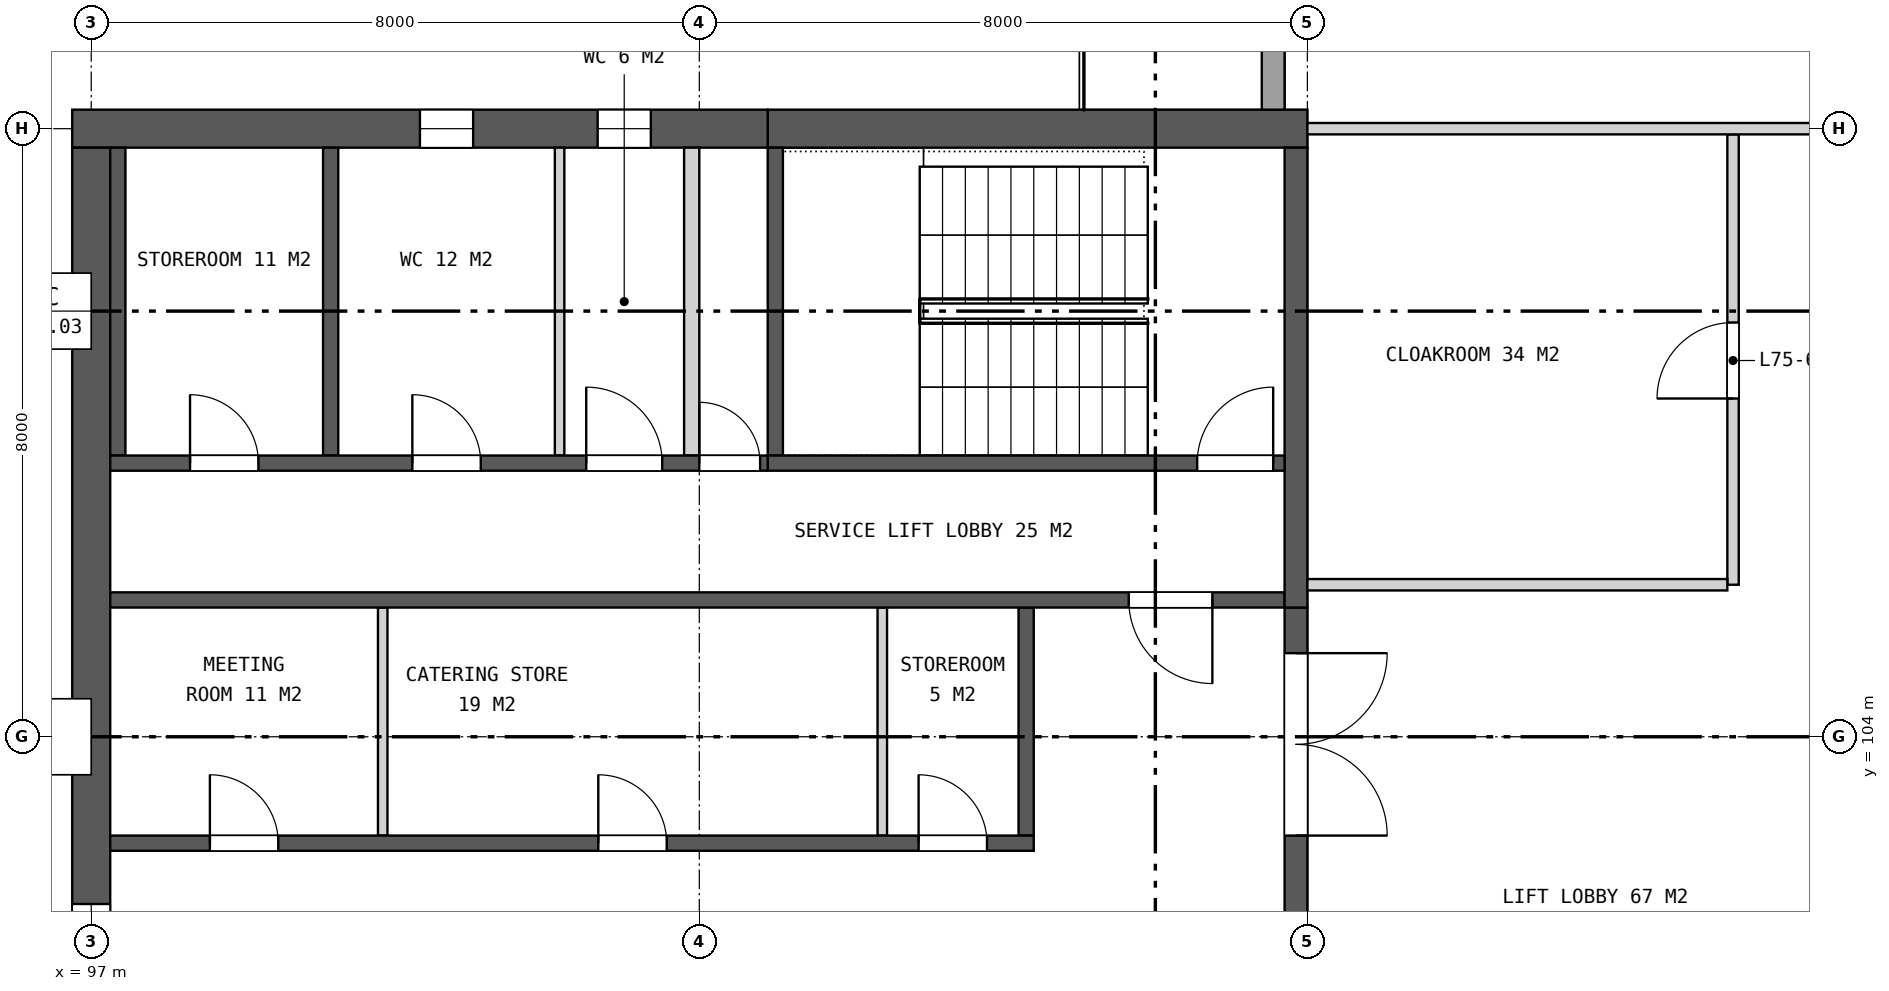
"""IFC4 building model, lengths in metres.
Left out: names, types, materials, properties, quantities, classifications, styles, units other than length and angle.
Written with IfcOpenShell. Run it as: python <this file> out.ifc"""

import sys

from ifc_helpers import new_model, si_unit, direction, frame, frame_2d, origin, place, context, subcontext, project, spatial, rectangle, extrude, element, fill, save


model = new_model("IFC4")
c1 = context("Model", 3, precision=1e-05, world=origin(), true_north=direction((0.0, 1.0)))
c2 = subcontext(c1, "Body", "Model", "MODEL_VIEW")
j1 = project(units=[si_unit("LENGTHUNIT", "METRE"), si_unit("PLANEANGLEUNIT", "RADIAN")], contexts=[c1])
p1 = place(None, origin())
s1 = spatial("IfcSite", under=j1, at=p1, CompositionType="ELEMENT")
p2 = place(p1, origin())
s2 = spatial("IfcBuilding", under=s1, at=p2, CompositionType="ELEMENT")
p3 = place(p2, frame((0.0, 0.0, 344.9)))
s3 = spatial("IfcBuildingStorey", under=s2, at=p3, CompositionType="ELEMENT", Elevation=344.9)
p4 = place(p3, frame((113.0, 112.0, 0.0), z_axis=(0.0, 0.0, 1.0), x_axis=(-1.0, 0.0, 0.0)))
e1 = element("IfcWall", 1, at=p4, inside=s3, PredefinedType="SHEAR", context=c2, shape_type="SweptSolid", body=[
    extrude(rectangle(XDim=7.1, YDim=0.5, at=frame_2d((3.55, 0.0))), origin(), (0.0, 0.0, 1.0), 4.2),
])
p5 = place(p3, frame((105.9, 112.0, 0.0), z_axis=(0.0, 0.0, 1.0), x_axis=(-1.0, 0.0, 0.0)))
e2 = element("IfcWall", 2, at=p5, inside=s3, PredefinedType="SHEAR", context=c2, shape_type="SweptSolid", body=[
    extrude(rectangle(XDim=9.15, YDim=0.5, at=frame_2d((4.575, 0.0))), origin(), (0.0, 0.0, 1.0), 4.2),
])
p6 = place(p5, frame((1.538, 0.0, 1.5)))
e3 = element("IfcOpeningElement", 3, at=p6, cuts=e2, PredefinedType="OPENING", context=c2, shape_type="SweptSolid", body=[
    extrude(rectangle(XDim=0.7, YDim=0.9, at=frame_2d((0.35, 0.45))), frame((0.0, 0.26, 0.0), z_axis=(0.0, -1.0, 0.0), x_axis=(1.0, 0.0, 0.0)), (0.0, 0.0, 1.0), 0.52),
])
p7 = place(p5, frame((3.875, 0.0, 1.5)))
e4 = element("IfcOpeningElement", 4, at=p7, cuts=e2, PredefinedType="OPENING", context=c2, shape_type="SweptSolid", body=[
    extrude(rectangle(XDim=0.7, YDim=0.9, at=frame_2d((0.35, 0.45))), frame((0.0, 0.26, 0.0), z_axis=(0.0, -1.0, 0.0), x_axis=(1.0, 0.0, 0.0)), (0.0, 0.0, 1.0), 0.52),
])
p8 = place(p3, frame((97.0, 111.75, 0.0), z_axis=(0.0, 0.0, 1.0), x_axis=(0.0, -1.0, 0.0)))
e5 = element("IfcWall", 5, at=p8, inside=s3, PredefinedType="SHEAR", context=c2, shape_type="SweptSolid", body=[
    extrude(rectangle(XDim=23.5, YDim=0.5, at=frame_2d((11.75, 0.0))), origin(), (0.0, 0.0, 1.0), 4.2),
])
p9 = place(p8, frame((9.95, 0.0, 0.15)))
e6 = element("IfcOpeningElement", 6, at=p9, cuts=e5, PredefinedType="OPENING", context=c2, shape_type="SweptSolid", body=[
    extrude(rectangle(XDim=3.6, YDim=3.0, at=frame_2d((1.8, 1.5))), frame((0.0, 0.26, 0.0), z_axis=(0.0, -1.0, 0.0), x_axis=(1.0, 0.0, 0.0)), (0.0, 0.0, 1.0), 0.52),
])
p10 = place(p3, frame((112.85, 105.7, 0.0), z_axis=(0.0, 0.0, 1.0), x_axis=(0.0, -1.0, 0.0)))
e7 = element("IfcWall", 7, at=p10, inside=s3, PredefinedType="SHEAR", context=c2, shape_type="SweptSolid", body=[
    extrude(rectangle(XDim=11.4, YDim=0.3, at=frame_2d((5.7, 0.0))), origin(), (0.0, 0.0, 1.0), 4.2),
])
p11 = place(p10, frame((0.6, 0.0, 0.0)))
e8 = element("IfcOpeningElement", 8, at=p11, cuts=e7, PredefinedType="OPENING", context=c2, shape_type="SweptSolid", body=[
    extrude(rectangle(XDim=2.4, YDim=2.4, at=frame_2d((1.2, 1.2))), frame((0.0, 0.16, 0.0), z_axis=(0.0, -1.0, 0.0), x_axis=(1.0, 0.0, 0.0)), (0.0, 0.0, 1.0), 0.32),
])
p12 = place(p10, frame((4.5, 0.0, 0.0)))
e9 = element("IfcOpeningElement", 9, at=p12, cuts=e7, PredefinedType="OPENING", context=c2, shape_type="SweptSolid", body=[
    extrude(rectangle(XDim=2.4, YDim=2.4, at=frame_2d((1.2, 1.2))), frame((0.0, 0.16, 0.0), z_axis=(0.0, -1.0, 0.0), x_axis=(1.0, 0.0, 0.0)), (0.0, 0.0, 1.0), 0.32),
])
p13 = place(p10, frame((8.4, 0.0, 0.0)))
e10 = element("IfcOpeningElement", 10, at=p13, cuts=e7, PredefinedType="OPENING", context=c2, shape_type="SweptSolid", body=[
    extrude(rectangle(XDim=2.4, YDim=2.4, at=frame_2d((1.2, 1.2))), frame((0.0, 0.16, 0.0), z_axis=(0.0, -1.0, 0.0), x_axis=(1.0, 0.0, 0.0)), (0.0, 0.0, 1.0), 0.32),
])
p14 = place(p3, frame((109.3, 105.7, 0.0), z_axis=(0.0, 0.0, 1.0), x_axis=(0.0, -1.0, 0.0)))
e11 = element("IfcWall", 11, at=p14, inside=s3, PredefinedType="SHEAR", context=c2, shape_type="SweptSolid", body=[
    extrude(rectangle(XDim=3.0, YDim=0.2, at=frame_2d((1.5, 0.0))), origin(), (0.0, 0.0, 1.0), 4.2),
])
for number, where, z_axis, x_axis in (
    (12, (107.407, 105.7, 0.0), (0.0, 0.0, 1.0), (0.0, -1.0, 0.0)),
    (13, (100.835, 105.7, 0.0), (0.0, 0.0, 1.0), (0.0, -1.0, 0.0)),
):
    element("IfcWall", number, at=place(p3, frame(where, z_axis=z_axis, x_axis=x_axis)), inside=s3, PredefinedType="PARTITIONING", context=c2, shape_type="SweptSolid", body=[
        extrude(rectangle(XDim=3.0, YDim=0.125, at=frame_2d((1.5, 0.0))), origin(), (0.0, 0.0, 1.0), 4.2),
    ])
p15 = place(p3, frame((109.4, 102.6, 0.0), z_axis=(0.0, 0.0, 1.0), x_axis=(-1.0, 0.0, 0.0)))
e14 = element("IfcWall", 14, at=p15, inside=s3, PredefinedType="SHEAR", context=c2, shape_type="SweptSolid", body=[
    extrude(rectangle(XDim=12.15, YDim=0.2, at=frame_2d((6.075, 0.0))), origin(), (0.0, 0.0, 1.0), 4.2),
])
p16 = place(p15, frame((0.615, 0.0, 0.0)))
e15 = element("IfcOpeningElement", 15, at=p16, cuts=e14, PredefinedType="OPENING", context=c2, shape_type="SweptSolid", body=[
    extrude(rectangle(XDim=0.9, YDim=2.1, at=frame_2d((0.45, 1.05))), frame((0.0, 0.11, 0.0), z_axis=(0.0, -1.0, 0.0), x_axis=(1.0, 0.0, 0.0)), (0.0, 0.0, 1.0), 0.22),
])
p17 = place(p15, frame((4.829, 0.0, 0.0)))
e16 = element("IfcOpeningElement", 16, at=p17, cuts=e14, PredefinedType="OPENING", context=c2, shape_type="SweptSolid", body=[
    extrude(rectangle(XDim=0.9, YDim=2.1, at=frame_2d((0.45, 1.05))), frame((0.0, 0.11, 0.0), z_axis=(0.0, -1.0, 0.0), x_axis=(1.0, 0.0, 0.0)), (0.0, 0.0, 1.0), 0.22),
])
p18 = place(p15, frame((9.939, 0.0, 0.0)))
e17 = element("IfcOpeningElement", 17, at=p18, cuts=e14, PredefinedType="OPENING", context=c2, shape_type="SweptSolid", body=[
    extrude(rectangle(XDim=0.9, YDim=2.1, at=frame_2d((0.45, 1.05))), frame((0.0, 0.11, 0.0), z_axis=(0.0, -1.0, 0.0), x_axis=(1.0, 0.0, 0.0)), (0.0, 0.0, 1.0), 0.22),
])
p19 = place(p3, frame((112.7, 105.8, 0.0), z_axis=(0.0, 0.0, 1.0), x_axis=(-1.0, 0.0, 0.0)))
e18 = element("IfcWall", 18, at=p19, inside=s3, PredefinedType="SHEAR", context=c2, shape_type="SweptSolid", body=[
    extrude(rectangle(XDim=15.45, YDim=0.2, at=frame_2d((7.725, 0.0))), origin(), (0.0, 0.0, 1.0), 4.2),
])
p20 = place(p19, frame((0.95, 0.0, 0.0)))
e19 = element("IfcOpeningElement", 19, at=p20, cuts=e18, PredefinedType="OPENING", context=c2, shape_type="SweptSolid", body=[
    extrude(rectangle(XDim=1.1, YDim=2.1, at=frame_2d((0.55, 1.05))), frame((0.0, 0.11, 0.0), z_axis=(0.0, -1.0, 0.0), x_axis=(1.0, 0.0, 0.0)), (0.0, 0.0, 1.0), 0.22),
])
p21 = place(p3, frame((112.85, 111.75, 0.0), z_axis=(0.0, 0.0, 1.0), x_axis=(0.0, -1.0, 0.0)))
e20 = element("IfcWall", 20, at=p21, inside=s3, PredefinedType="SHEAR", context=c2, shape_type="SweptSolid", body=[
    extrude(rectangle(XDim=6.05, YDim=0.3, at=frame_2d((3.025, 0.0))), origin(), (0.0, 0.0, 1.0), 4.2),
])
for number, where, z_axis, x_axis in (
    (21, (106.0, 111.75, 0.0), (0.0, 0.0, 1.0), (0.0, -1.0, 0.0)),
    (22, (100.15, 111.75, 0.0), (0.0, 0.0, 1.0), (0.0, -1.0, 0.0)),
    (23, (97.35, 111.75, 0.0), (0.0, 0.0, 1.0), (0.0, -1.0, 0.0)),
):
    element("IfcWall", number, at=place(p3, frame(where, z_axis=z_axis, x_axis=x_axis)), inside=s3, PredefinedType="SHEAR", context=c2, shape_type="SweptSolid", body=[
        extrude(rectangle(XDim=4.05, YDim=0.2, at=frame_2d((2.025, 0.0))), origin(), (0.0, 0.0, 1.0), 4.2),
    ])
p22 = place(p3, frame((104.9, 111.75, 0.0), z_axis=(0.0, 0.0, 1.0), x_axis=(0.0, -1.0, 0.0)))
e24 = element("IfcWall", 24, at=p22, inside=s3, PredefinedType="PARTITIONING", context=c2, shape_type="SweptSolid", body=[
    extrude(rectangle(XDim=4.05, YDim=0.2, at=frame_2d((2.025, 0.0))), origin(), (0.0, 0.0, 1.0), 4.2),
])
p23 = place(p3, frame((103.162, 111.75, 0.0), z_axis=(0.0, 0.0, 1.0), x_axis=(0.0, -1.0, 0.0)))
e25 = element("IfcWall", 25, at=p23, inside=s3, PredefinedType="PARTITIONING", context=c2, shape_type="SweptSolid", body=[
    extrude(rectangle(XDim=4.05, YDim=0.125, at=frame_2d((2.025, 0.0))), origin(), (0.0, 0.0, 1.0), 4.2),
])
p24 = place(p3, frame((112.7, 107.6, 0.0), z_axis=(0.0, 0.0, 1.0), x_axis=(-1.0, 0.0, 0.0)))
e26 = element("IfcWall", 26, at=p24, inside=s3, PredefinedType="SHEAR", context=c2, shape_type="SweptSolid", body=[
    extrude(rectangle(XDim=6.8, YDim=0.2, at=frame_2d((3.4, 0.0))), origin(), (0.0, 0.0, 1.0), 4.2),
])
p25 = place(p24, frame((0.15, 0.0, 0.0)))
e27 = element("IfcOpeningElement", 27, at=p25, cuts=e26, PredefinedType="OPENING", context=c2, shape_type="SweptSolid", body=[
    extrude(rectangle(XDim=1.0, YDim=2.1, at=frame_2d((0.5, 1.05))), frame((0.0, 0.11, 0.0), z_axis=(0.0, -1.0, 0.0), x_axis=(1.0, 0.0, 0.0)), (0.0, 0.0, 1.0), 0.22),
])
p26 = place(p3, frame((105.9, 107.6, 0.0), z_axis=(0.0, 0.0, 1.0), x_axis=(-1.0, 0.0, 0.0)))
e28 = element("IfcWall", 28, at=p26, inside=s3, PredefinedType="SHEAR", context=c2, shape_type="SweptSolid", body=[
    extrude(rectangle(XDim=8.65, YDim=0.2, at=frame_2d((4.325, 0.0))), origin(), (0.0, 0.0, 1.0), 4.2),
])
p27 = place(p26, frame((0.1, 0.0, 0.0)))
e29 = element("IfcOpeningElement", 29, at=p27, cuts=e28, PredefinedType="OPENING", context=c2, shape_type="SweptSolid", body=[
    extrude(rectangle(XDim=0.8, YDim=2.1, at=frame_2d((0.4, 1.05))), frame((0.0, 0.11, 0.0), z_axis=(0.0, -1.0, 0.0), x_axis=(1.0, 0.0, 0.0)), (0.0, 0.0, 1.0), 0.22),
])
p28 = place(p26, frame((1.388, 0.0, 0.0)))
e30 = element("IfcOpeningElement", 30, at=p28, cuts=e28, PredefinedType="OPENING", context=c2, shape_type="SweptSolid", body=[
    extrude(rectangle(XDim=1.0, YDim=2.1, at=frame_2d((0.5, 1.05))), frame((0.0, 0.11, 0.0), z_axis=(0.0, -1.0, 0.0), x_axis=(1.0, 0.0, 0.0)), (0.0, 0.0, 1.0), 0.22),
])
p29 = place(p26, frame((3.775, 0.0, 0.0)))
e31 = element("IfcOpeningElement", 31, at=p29, cuts=e28, PredefinedType="OPENING", context=c2, shape_type="SweptSolid", body=[
    extrude(rectangle(XDim=0.9, YDim=2.1, at=frame_2d((0.45, 1.05))), frame((0.0, 0.11, 0.0), z_axis=(0.0, -1.0, 0.0), x_axis=(1.0, 0.0, 0.0)), (0.0, 0.0, 1.0), 0.22),
])
p30 = place(p26, frame((6.7, 0.0, 0.0)))
e32 = element("IfcOpeningElement", 32, at=p30, cuts=e28, PredefinedType="OPENING", context=c2, shape_type="SweptSolid", body=[
    extrude(rectangle(XDim=0.9, YDim=2.1, at=frame_2d((0.45, 1.05))), frame((0.0, 0.11, 0.0), z_axis=(0.0, -1.0, 0.0), x_axis=(1.0, 0.0, 0.0)), (0.0, 0.0, 1.0), 0.22),
])
p31 = place(p3, frame((112.55, 119.962, 0.0), z_axis=(0.0, 0.0, 1.0), x_axis=(0.0, -1.0, 0.0)))
e33 = element("IfcWall", 33, at=p31, inside=s3, PredefinedType="SOLIDWALL", context=c2, shape_type="SweptSolid", body=[
    extrude(rectangle(XDim=7.712, YDim=0.3, at=frame_2d((3.856, 0.0))), origin(), (0.0, 0.0, 1.0), 3.85),
])
p32 = place(p31, frame((2.762, 0.0, 0.0)))
e34 = element("IfcOpeningElement", 34, at=p32, cuts=e33, PredefinedType="OPENING", context=c2, shape_type="SweptSolid", body=[
    extrude(rectangle(XDim=2.4, YDim=2.4, at=frame_2d((1.2, 1.2))), frame((0.0, 0.16, 0.0), z_axis=(0.0, -1.0, 0.0), x_axis=(1.0, 0.0, 0.0)), (0.0, 0.0, 1.0), 0.32),
])
p33 = place(p3, frame((118.6, 106.0, 0.0), z_axis=(0.0, 0.0, 1.0), x_axis=(0.0, 1.0, 0.0)))
e35 = element("IfcWall", 35, at=p33, inside=s3, PredefinedType="PARTITIONING", context=c2, shape_type="SweptSolid", body=[
    extrude(rectangle(XDim=5.925, YDim=0.15, at=frame_2d((2.962, 0.0))), origin(), (0.0, 0.0, 1.0), 3.396),
])
p34 = place(p33, frame((2.45, 0.0, 0.0)))
e36 = element("IfcOpeningElement", 36, at=p34, cuts=e35, PredefinedType="OPENING", context=c2, shape_type="SweptSolid", body=[
    extrude(rectangle(XDim=1.0, YDim=2.1, at=frame_2d((0.5, 1.05))), frame((0.0, 0.085, 0.0), z_axis=(0.0, -1.0, 0.0), x_axis=(1.0, 0.0, 0.0)), (0.0, 0.0, 1.0), 0.17),
])
p35 = place(p3, frame((113.0, 106.0, 0.0), z_axis=(0.0, 0.0, 1.0), x_axis=(1.0, 0.0, 0.0)))
e37 = element("IfcWall", 37, at=p35, inside=s3, PredefinedType="PARTITIONING", context=c2, shape_type="SweptSolid", body=[
    extrude(rectangle(XDim=5.525, YDim=0.15, at=frame_2d((2.762, 0.0))), origin(), (0.0, 0.0, 1.0), 3.396),
])
p36 = place(p3, frame((113.0, 112.0, 0.0), z_axis=(0.0, 0.0, 1.0), x_axis=(1.0, 0.0, 0.0)))
e38 = element("IfcWall", 38, at=p36, inside=s3, PredefinedType="PARTITIONING", context=c2, shape_type="SweptSolid", body=[
    extrude(rectangle(XDim=24.0, YDim=0.15, at=frame_2d((12.0, 0.0))), origin(), (0.0, 0.0, 1.0), 3.396),
])
p37 = place(p36, frame((9.95, 0.0, 0.0)))
e39 = element("IfcOpeningElement", 39, at=p37, cuts=e38, PredefinedType="OPENING", context=c2, shape_type="SweptSolid", body=[
    extrude(rectangle(XDim=1.8, YDim=2.1, at=frame_2d((0.9, 1.05))), frame((0.0, 0.085, 0.0), z_axis=(0.0, -1.0, 0.0), x_axis=(1.0, 0.0, 0.0)), (0.0, 0.0, 1.0), 0.17),
])
p38 = place(p36, frame((16.65, 0.0, 0.0)))
e40 = element("IfcOpeningElement", 40, at=p38, cuts=e38, PredefinedType="OPENING", context=c2, shape_type="SweptSolid", body=[
    extrude(rectangle(XDim=1.0, YDim=2.1, at=frame_2d((0.5, 1.05))), frame((0.0, 0.085, 0.0), z_axis=(0.0, -1.0, 0.0), x_axis=(1.0, 0.0, 0.0)), (0.0, 0.0, 1.0), 0.17),
])
p39 = place(p6, origin())
e41 = element("IfcWindow", 41, at=p39, inside=s3, PartitioningType="SINGLE_PANEL", PredefinedType="WINDOW", context=c2, shape_type="SweptSolid", body=[
    extrude(rectangle(XDim=0.7, YDim=0.9, at=frame_2d((0.35, 0.45))), frame((0.0, 0.03, 0.0), z_axis=(0.0, -1.0, 0.0), x_axis=(1.0, 0.0, 0.0)), (0.0, 0.0, 1.0), 0.06),
])
fill(e3, e41)
p40 = place(p7, origin())
e42 = element("IfcWindow", 42, at=p40, inside=s3, PartitioningType="SINGLE_PANEL", PredefinedType="WINDOW", context=c2, shape_type="SweptSolid", body=[
    extrude(rectangle(XDim=0.7, YDim=0.9, at=frame_2d((0.35, 0.45))), frame((0.0, 0.03, 0.0), z_axis=(0.0, -1.0, 0.0), x_axis=(1.0, 0.0, 0.0)), (0.0, 0.0, 1.0), 0.06),
])
fill(e4, e42)
p41 = place(p9, origin())
e43 = element("IfcWindow", 43, at=p41, inside=s3, PartitioningType="SINGLE_PANEL", PredefinedType="WINDOW", context=c2, shape_type="SweptSolid", body=[
    extrude(rectangle(XDim=3.6, YDim=3.0, at=frame_2d((1.8, 1.5))), frame((0.0, 0.03, 0.0), z_axis=(0.0, -1.0, 0.0), x_axis=(1.0, 0.0, 0.0)), (0.0, 0.0, 1.0), 0.06),
])
fill(e6, e43)
p42 = place(p11, origin())
e44 = element("IfcDoor", 44, at=p42, inside=s3, OperationType="DOUBLE_DOOR_SINGLE_SWING", PredefinedType="DOOR", context=c2, shape_type="SweptSolid", body=[
    extrude(rectangle(XDim=2.4, YDim=2.4, at=frame_2d((1.2, 1.2))), frame((0.0, 0.025, 0.0), z_axis=(0.0, -1.0, 0.0), x_axis=(1.0, 0.0, 0.0)), (0.0, 0.0, 1.0), 0.05),
])
fill(e8, e44)
p43 = place(p16, frame((0.9, 0.0, 0.0), z_axis=(0.0, 0.0, 1.0), x_axis=(-1.0, 0.0, 0.0)))
e45 = element("IfcDoor", 45, at=p43, inside=s3, OperationType="SINGLE_SWING_LEFT", PredefinedType="DOOR", context=c2, shape_type="SweptSolid", body=[
    extrude(rectangle(XDim=0.9, YDim=2.1, at=frame_2d((0.45, 1.05))), frame((0.0, 0.025, 0.0), z_axis=(0.0, -1.0, 0.0), x_axis=(1.0, 0.0, 0.0)), (0.0, 0.0, 1.0), 0.05),
])
fill(e15, e45)
p44 = place(p17, frame((0.9, 0.0, 0.0), z_axis=(0.0, 0.0, 1.0), x_axis=(-1.0, 0.0, 0.0)))
e46 = element("IfcDoor", 46, at=p44, inside=s3, OperationType="SINGLE_SWING_LEFT", PredefinedType="DOOR", context=c2, shape_type="SweptSolid", body=[
    extrude(rectangle(XDim=0.9, YDim=2.1, at=frame_2d((0.45, 1.05))), frame((0.0, 0.025, 0.0), z_axis=(0.0, -1.0, 0.0), x_axis=(1.0, 0.0, 0.0)), (0.0, 0.0, 1.0), 0.05),
])
fill(e16, e46)
p45 = place(p18, frame((0.9, 0.0, 0.0), z_axis=(0.0, 0.0, 1.0), x_axis=(-1.0, 0.0, 0.0)))
e47 = element("IfcDoor", 47, at=p45, inside=s3, OperationType="SINGLE_SWING_LEFT", PredefinedType="DOOR", context=c2, shape_type="SweptSolid", body=[
    extrude(rectangle(XDim=0.9, YDim=2.1, at=frame_2d((0.45, 1.05))), frame((0.0, 0.025, 0.0), z_axis=(0.0, -1.0, 0.0), x_axis=(1.0, 0.0, 0.0)), (0.0, 0.0, 1.0), 0.05),
])
fill(e17, e47)
p46 = place(p20, origin())
e48 = element("IfcDoor", 48, at=p46, inside=s3, OperationType="SINGLE_SWING_LEFT", PredefinedType="DOOR", context=c2, shape_type="SweptSolid", body=[
    extrude(rectangle(XDim=1.1, YDim=2.1, at=frame_2d((0.55, 1.05))), frame((0.0, 0.025, 0.0), z_axis=(0.0, -1.0, 0.0), x_axis=(1.0, 0.0, 0.0)), (0.0, 0.0, 1.0), 0.05),
])
fill(e19, e48)
p47 = place(p25, frame((1.0, 0.0, 0.0), z_axis=(0.0, 0.0, 1.0), x_axis=(-1.0, 0.0, 0.0)))
e49 = element("IfcDoor", 49, at=p47, inside=s3, OperationType="SINGLE_SWING_RIGHT", PredefinedType="DOOR", context=c2, shape_type="SweptSolid", body=[
    extrude(rectangle(XDim=1.0, YDim=2.1, at=frame_2d((0.5, 1.05))), frame((0.0, 0.025, 0.0), z_axis=(0.0, -1.0, 0.0), x_axis=(1.0, 0.0, 0.0)), (0.0, 0.0, 1.0), 0.05),
])
fill(e27, e49)
p48 = place(p27, frame((0.8, 0.0, 0.0), z_axis=(0.0, 0.0, 1.0), x_axis=(-1.0, 0.0, 0.0)))
e50 = element("IfcDoor", 50, at=p48, inside=s3, OperationType="SINGLE_SWING_LEFT", PredefinedType="DOOR", context=c2, shape_type="SweptSolid", body=[
    extrude(rectangle(XDim=0.8, YDim=2.1, at=frame_2d((0.4, 1.05))), frame((0.0, 0.025, 0.0), z_axis=(0.0, -1.0, 0.0), x_axis=(1.0, 0.0, 0.0)), (0.0, 0.0, 1.0), 0.05),
])
fill(e29, e50)
p49 = place(p28, frame((1.0, 0.0, 0.0), z_axis=(0.0, 0.0, 1.0), x_axis=(-1.0, 0.0, 0.0)))
e51 = element("IfcDoor", 51, at=p49, inside=s3, OperationType="SINGLE_SWING_LEFT", PredefinedType="DOOR", context=c2, shape_type="SweptSolid", body=[
    extrude(rectangle(XDim=1.0, YDim=2.1, at=frame_2d((0.5, 1.05))), frame((0.0, 0.025, 0.0), z_axis=(0.0, -1.0, 0.0), x_axis=(1.0, 0.0, 0.0)), (0.0, 0.0, 1.0), 0.05),
])
fill(e30, e51)
p50 = place(p29, frame((0.9, 0.0, 0.0), z_axis=(0.0, 0.0, 1.0), x_axis=(-1.0, 0.0, 0.0)))
e52 = element("IfcDoor", 52, at=p50, inside=s3, OperationType="SINGLE_SWING_LEFT", PredefinedType="DOOR", context=c2, shape_type="SweptSolid", body=[
    extrude(rectangle(XDim=0.9, YDim=2.1, at=frame_2d((0.45, 1.05))), frame((0.0, 0.025, 0.0), z_axis=(0.0, -1.0, 0.0), x_axis=(1.0, 0.0, 0.0)), (0.0, 0.0, 1.0), 0.05),
])
fill(e31, e52)
p51 = place(p30, frame((0.9, 0.0, 0.0), z_axis=(0.0, 0.0, 1.0), x_axis=(-1.0, 0.0, 0.0)))
e53 = element("IfcDoor", 53, at=p51, inside=s3, OperationType="SINGLE_SWING_LEFT", PredefinedType="DOOR", context=c2, shape_type="SweptSolid", body=[
    extrude(rectangle(XDim=0.9, YDim=2.1, at=frame_2d((0.45, 1.05))), frame((0.0, 0.025, 0.0), z_axis=(0.0, -1.0, 0.0), x_axis=(1.0, 0.0, 0.0)), (0.0, 0.0, 1.0), 0.05),
])
fill(e32, e53)
p52 = place(p34, origin())
e54 = element("IfcDoor", 54, at=p52, inside=s3, OperationType="SINGLE_SWING_LEFT", PredefinedType="DOOR", context=c2, shape_type="SweptSolid", body=[
    extrude(rectangle(XDim=1.0, YDim=2.1, at=frame_2d((0.5, 1.05))), frame((0.0, 0.025, 0.0), z_axis=(0.0, -1.0, 0.0), x_axis=(1.0, 0.0, 0.0)), (0.0, 0.0, 1.0), 0.05),
])
fill(e36, e54)
save(model, sys.argv[1])
